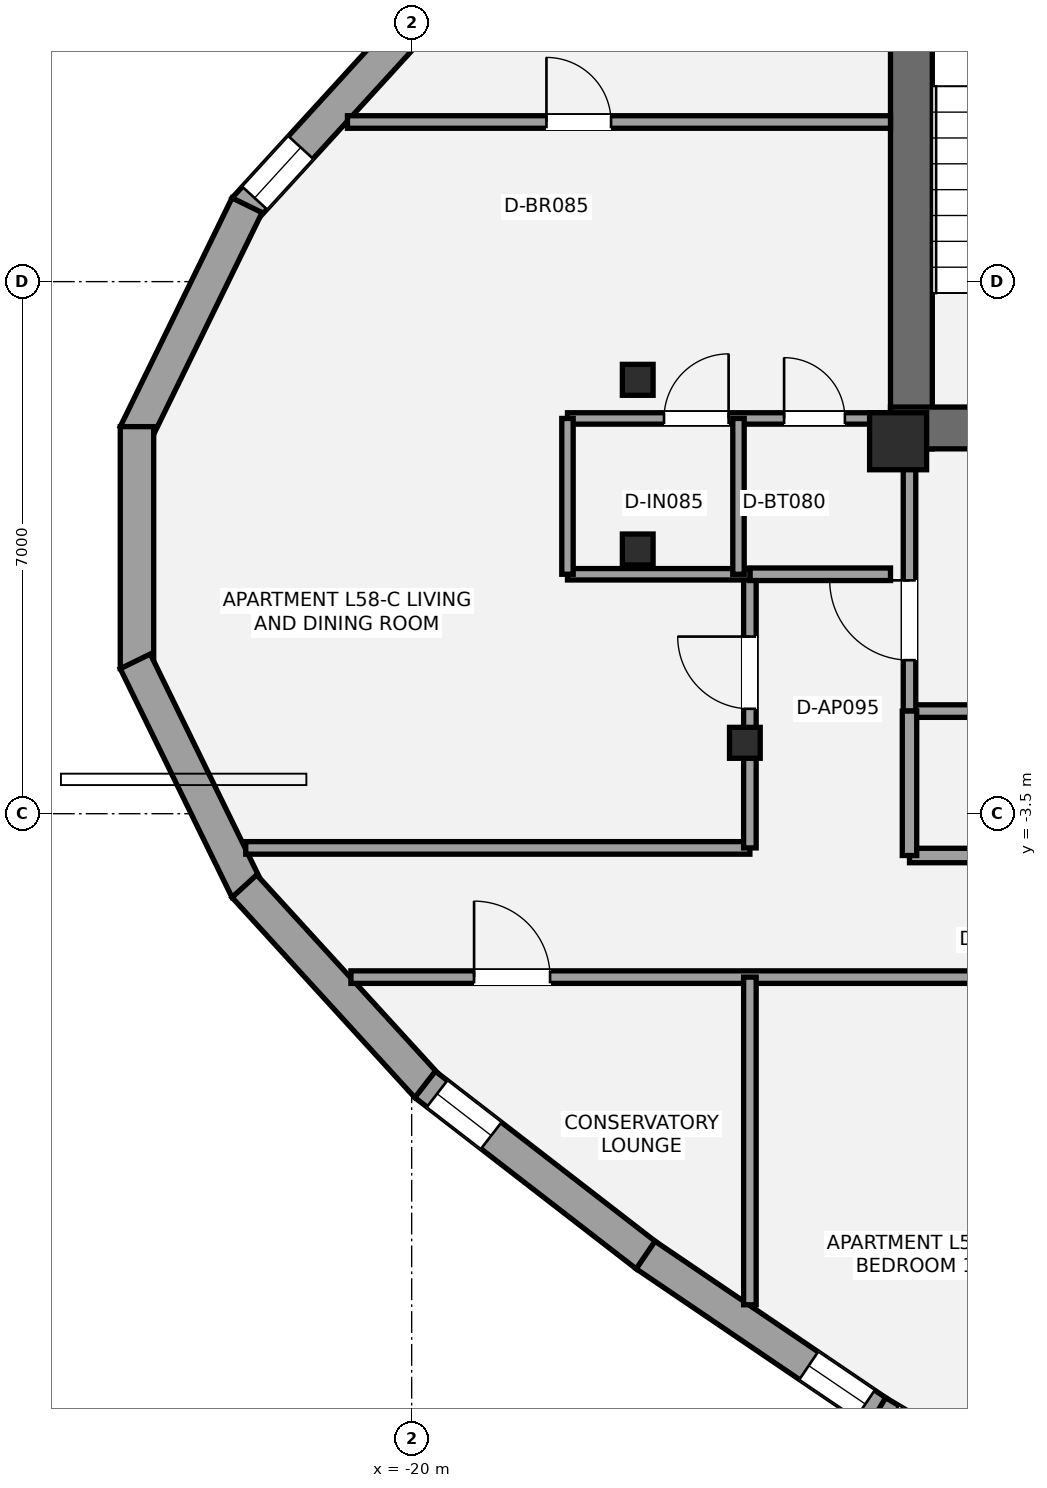
"""IFC4 building model, lengths in metres.
Left out: names, types, materials, properties, quantities, classifications, styles, units other than length and angle.
Written with IfcOpenShell. Run it as: python <this file> out.ifc"""

import sys

from ifc_helpers import new_model, si_unit, direction, frame, frame_2d, origin, origin_2d, place, context, subcontext, project, spatial, rectangle, i_section, extrude, element, fill, save


model = new_model("IFC4")
c1 = context("Model", 3, precision=1e-05, world=origin(), true_north=direction((0.0, 1.0)))
c2 = subcontext(c1, "Body", "Model", "MODEL_VIEW")
j1 = project(units=[si_unit("LENGTHUNIT", "METRE"), si_unit("PLANEANGLEUNIT", "RADIAN")], contexts=[c1])
p1 = place(None, origin())
s1 = spatial("IfcSite", under=j1, at=p1, CompositionType="ELEMENT")
p2 = place(p1, origin())
s2 = spatial("IfcBuilding", under=s1, at=p2, CompositionType="ELEMENT")
p3 = place(p2, frame((0.0, 0.0, 210.0)))
s3 = spatial("IfcBuildingStorey", under=s2, at=p3, CompositionType="ELEMENT", Elevation=210.0)
p4 = place(p3, frame((-13.425, 1.3, 0.0), z_axis=(0.0, 0.0, 1.0), x_axis=(0.0, 1.0, 0.0)))
e1 = element("IfcWall", 1, at=p4, inside=s3, PredefinedType="SHEAR", context=c2, shape_type="SweptSolid", body=[
    extrude(rectangle(XDim=8.25, YDim=0.55, at=frame_2d((4.125, 0.0))), origin(), (0.0, 0.0, 1.0), 3.15),
])
p5 = place(p3, frame((-4.925, 1.575, 0.0), z_axis=(0.0, 0.0, 1.0), x_axis=(-1.0, 0.0, 0.0)))
e2 = element("IfcWall", 2, at=p5, inside=s3, PredefinedType="SHEAR", context=c2, shape_type="SweptSolid", body=[
    extrude(rectangle(XDim=8.775, YDim=0.55, at=frame_2d((4.387, 0.0))), origin(), (0.0, 0.0, 1.0), 3.15),
])
p6 = place(p5, frame((5.375, 0.0, 0.0)))
e3 = element("IfcOpeningElement", 3, at=p6, cuts=e2, PredefinedType="OPENING", context=c2, shape_type="SweptSolid", body=[
    extrude(rectangle(XDim=1.05, YDim=2.15, at=frame_2d((0.525, 1.075))), frame((0.0, 0.285, 0.0), z_axis=(0.0, -1.0, 0.0), x_axis=(1.0, 0.0, 0.0)), (0.0, 0.0, 1.0), 0.57),
])
p7 = place(p5, frame((3.705, 0.0, 0.0)))
e4 = element("IfcOpeningElement", 4, at=p7, cuts=e2, PredefinedType="OPENING", context=c2, shape_type="SweptSolid", body=[
    extrude(rectangle(XDim=1.1, YDim=2.2, at=frame_2d((0.55, 1.1))), frame((0.0, 0.285, 0.0), z_axis=(0.0, -1.0, 0.0), x_axis=(1.0, 0.0, 0.0)), (0.0, 0.0, 1.0), 0.57),
])
p8 = place(p3, frame((-13.6, 1.4, 0.0), z_axis=(0.0, 0.0, 1.0), x_axis=(1.0, 0.0, 0.0)))
e5 = element("IfcColumn", 5, at=p8, inside=s3, PredefinedType="PILASTER", context=c2, shape_type="SweptSolid", body=[
    extrude(rectangle(XDim=0.75, YDim=0.75, at=origin_2d()), origin(), (0.0, 0.0, 1.0), 3.15),
])
for number, where, z_axis, x_axis in (
    (6, (-17.026, 2.208, 0.0), (0.0, 0.0, 1.0), (1.0, 0.0, 0.0)),
    (7, (-17.026, -0.024, 0.0), (0.0, 0.0, 1.0), (1.0, 0.0, 0.0)),
    (8, (-15.616, -2.567, 0.0), (0.0, 0.0, 1.0), (1.0, 0.0, 0.0)),
):
    element("IfcColumn", number, at=place(p3, frame(where, z_axis=z_axis, x_axis=x_axis)), inside=s3, PredefinedType="COLUMN", context=c2, shape_type="SweptSolid", body=[
        extrude(i_section(OverallWidth=0.404, OverallDepth=0.407, WebThickness=0.027, FlangeThickness=0.044, at=origin_2d()), origin(), (0.0, 0.0, 1.0), 3.15),
    ])
p9 = place(p3, frame((-22.201, 4.453, 0.0), z_axis=(0.0, 0.0, 1.0), x_axis=(0.674353738675, 0.738408447362, 0.0)))
e9 = element("IfcWall", 9, at=p9, inside=s3, PredefinedType="STANDARD", context=c2, shape_type="SweptSolid", body=[
    extrude(rectangle(XDim=3.568, YDim=0.44, at=frame_2d((1.784, 0.0))), origin(), (0.0, 0.0, 1.0), 2.336),
])
p10 = place(p9, frame((0.2, 0.0, 0.42)))
e10 = element("IfcOpeningElement", 10, at=p10, cuts=e9, PredefinedType="OPENING", context=c2, shape_type="SweptSolid", body=[
    extrude(rectangle(XDim=0.9, YDim=1.35, at=frame_2d((0.45, 0.675))), frame((0.0, 0.23, 0.0), z_axis=(0.0, -1.0, 0.0), x_axis=(1.0, 0.0, 0.0)), (0.0, 0.0, 1.0), 0.46),
])
p11 = place(p3, frame((-23.636, 1.496, 0.0), z_axis=(0.0, 0.0, 1.0), x_axis=(0.439000922584, 0.898486610902, 0.0)))
e11 = element("IfcWall", 11, at=p11, inside=s3, PredefinedType="STANDARD", context=c2, shape_type="SweptSolid", body=[
    extrude(rectangle(XDim=3.349, YDim=0.44, at=frame_2d((1.675, 0.0))), origin(), (0.0, 0.0, 1.0), 2.336),
])
p12 = place(p3, frame((-23.614, -1.592, 0.0), z_axis=(0.0, 0.0, 1.0), x_axis=(0.0, 1.0, 0.0)))
e12 = element("IfcWall", 12, at=p12, inside=s3, PredefinedType="STANDARD", context=c2, shape_type="SweptSolid", body=[
    extrude(rectangle(XDim=3.185, YDim=0.44, at=frame_2d((1.592, 0.0))), origin(), (0.0, 0.0, 1.0), 2.336),
])
p13 = place(p3, frame((-22.166, -4.505, 0.0), z_axis=(0.0, 0.0, 1.0), x_axis=(-0.439000922584, 0.898486610902, 0.0)))
e13 = element("IfcWall", 13, at=p13, inside=s3, PredefinedType="STANDARD", context=c2, shape_type="SweptSolid", body=[
    extrude(rectangle(XDim=3.349, YDim=0.44, at=frame_2d((1.675, 0.0))), origin(), (0.0, 0.0, 1.0), 2.336),
])
p14 = place(p3, frame((-19.795, -7.087, 0.0), z_axis=(0.0, 0.0, 1.0), x_axis=(-0.674353738675, 0.738408447362, 0.0)))
e14 = element("IfcWall", 14, at=p14, inside=s3, PredefinedType="STANDARD", context=c2, shape_type="SweptSolid", body=[
    extrude(rectangle(XDim=3.568, YDim=0.44, at=frame_2d((1.784, 0.0))), origin(), (0.0, 0.0, 1.0), 2.336),
])
p15 = place(p3, frame((-16.911, -9.314, 0.0), z_axis=(0.0, 0.0, 1.0), x_axis=(-0.791016617957, 0.61179466336, 0.0)))
e15 = element("IfcWall", 15, at=p15, inside=s3, PredefinedType="STANDARD", context=c2, shape_type="SweptSolid", body=[
    extrude(rectangle(XDim=3.682, YDim=0.44, at=frame_2d((1.841, 0.0))), origin(), (0.0, 0.0, 1.0), 2.336),
])
p16 = place(p15, frame((2.582, 0.0, 0.42)))
e16 = element("IfcOpeningElement", 16, at=p16, cuts=e15, PredefinedType="OPENING", context=c2, shape_type="SweptSolid", body=[
    extrude(rectangle(XDim=0.9, YDim=1.35, at=frame_2d((0.45, 0.675))), frame((0.0, 0.23, 0.0), z_axis=(0.0, -1.0, 0.0), x_axis=(1.0, 0.0, 0.0)), (0.0, 0.0, 1.0), 0.46),
])
p17 = place(p3, frame((-13.865, -11.379, 0.0), z_axis=(0.0, 0.0, 1.0), x_axis=(-0.827589832786, 0.561333295529, 0.0)))
e17 = element("IfcWall", 17, at=p17, inside=s3, PredefinedType="STANDARD", context=c2, shape_type="SweptSolid", body=[
    extrude(rectangle(XDim=3.693, YDim=0.44, at=frame_2d((1.847, 0.0))), origin(), (0.0, 0.0, 1.0), 2.336),
])
p18 = place(p17, frame((0.2, 0.0, 0.42)))
e18 = element("IfcOpeningElement", 18, at=p18, cuts=e17, PredefinedType="OPENING", context=c2, shape_type="SweptSolid", body=[
    extrude(rectangle(XDim=0.9, YDim=1.35, at=frame_2d((0.45, 0.675))), frame((0.0, 0.23, 0.0), z_axis=(0.0, -1.0, 0.0), x_axis=(1.0, 0.0, 0.0)), (0.0, 0.0, 1.0), 0.46),
])
p19 = place(p3, frame((-10.555, -13.348, 0.0), z_axis=(0.0, 0.0, 1.0), x_axis=(-0.859415840392, 0.511277237204, 0.0)))
e19 = element("IfcWall", 19, at=p19, inside=s3, PredefinedType="STANDARD", context=c2, shape_type="SweptSolid", body=[
    extrude(rectangle(XDim=3.864, YDim=0.44, at=frame_2d((1.932, 0.0))), origin(), (0.0, 0.0, 1.0), 2.336),
])
p20 = place(p19, frame((2.764, 0.0, 0.58)))
e20 = element("IfcOpeningElement", 20, at=p20, cuts=e19, PredefinedType="OPENING", context=c2, shape_type="SweptSolid", body=[
    extrude(rectangle(XDim=0.9, YDim=1.35, at=frame_2d((0.45, 0.675))), frame((0.0, 0.23, 0.0), z_axis=(0.0, -1.0, 0.0), x_axis=(1.0, 0.0, 0.0)), (0.0, 0.0, 1.0), 0.46),
])
p21 = place(p3, frame((-13.45, -2.15, 0.0), z_axis=(0.0, 0.0, 1.0), x_axis=(1.0, 0.0, 0.0)))
e21 = element("IfcWall", 21, at=p21, inside=s3, PredefinedType="PARTITIONING", context=c2, shape_type="SweptSolid", body=[
    extrude(rectangle(XDim=6.25, YDim=0.165, at=frame_2d((3.125, 0.0))), origin(), (0.0, 0.0, 1.0), 2.423),
])
p22 = place(p3, frame((-13.45, -2.15, 0.0), z_axis=(0.0, 0.0, 1.0), x_axis=(0.0, 1.0, 0.0)))
e22 = element("IfcWall", 22, at=p22, inside=s3, PredefinedType="PARTITIONING", context=c2, shape_type="SweptSolid", body=[
    extrude(rectangle(XDim=3.5, YDim=0.165, at=frame_2d((1.75, 0.0))), origin(), (0.0, 0.0, 1.0), 2.423),
])
p23 = place(p22, frame((0.67, 0.0, 0.0)))
e23 = element("IfcOpeningElement", 23, at=p23, cuts=e22, PredefinedType="OPENING", context=c2, shape_type="SweptSolid", body=[
    extrude(rectangle(XDim=1.05, YDim=2.15, at=frame_2d((0.525, 1.075))), frame((0.0, 0.093, 0.0), z_axis=(0.0, -1.0, 0.0), x_axis=(1.0, 0.0, 0.0)), (0.0, 0.0, 1.0), 0.185),
])
p24 = place(p3, frame((-13.45, -4.05, 0.0), z_axis=(0.0, 0.0, 1.0), x_axis=(1.0, 0.0, 0.0)))
e24 = element("IfcWall", 24, at=p24, inside=s3, PredefinedType="PLUMBINGWALL", context=c2, shape_type="SweptSolid", body=[
    extrude(rectangle(XDim=11.35, YDim=0.19, at=frame_2d((5.675, 0.0))), origin(), (0.0, 0.0, 1.0), 2.357),
])
p25 = place(p24, frame((1.25, 0.0, 0.0)))
e25 = element("IfcOpeningElement", 25, at=p25, cuts=e24, PredefinedType="OPENING", context=c2, shape_type="SweptSolid", body=[
    extrude(rectangle(XDim=0.85, YDim=2.1, at=frame_2d((0.425, 1.05))), frame((0.0, 0.105, 0.0), z_axis=(0.0, -1.0, 0.0), x_axis=(1.0, 0.0, 0.0)), (0.0, 0.0, 1.0), 0.21),
])
p26 = place(p24, frame((5.1, 0.0, 0.0)))
e26 = element("IfcOpeningElement", 26, at=p26, cuts=e24, PredefinedType="OPENING", context=c2, shape_type="SweptSolid", body=[
    extrude(rectangle(XDim=0.85, YDim=2.1, at=frame_2d((0.425, 1.05))), frame((0.0, 0.105, 0.0), z_axis=(0.0, -1.0, 0.0), x_axis=(1.0, 0.0, 0.0)), (0.0, 0.0, 1.0), 0.21),
])
p27 = place(p24, frame((8.95, 0.0, 0.0)))
e27 = element("IfcOpeningElement", 27, at=p27, cuts=e24, PredefinedType="OPENING", context=c2, shape_type="SweptSolid", body=[
    extrude(rectangle(XDim=0.95, YDim=2.15, at=frame_2d((0.475, 1.075))), frame((0.0, 0.105, 0.0), z_axis=(0.0, -1.0, 0.0), x_axis=(1.0, 0.0, 0.0)), (0.0, 0.0, 1.0), 0.21),
])
p28 = place(p3, frame((-13.45, -4.05, 0.0), z_axis=(0.0, 0.0, 1.0), x_axis=(0.0, 1.0, 0.0)))
e28 = element("IfcWall", 28, at=p28, inside=s3, PredefinedType="PLUMBINGWALL", context=c2, shape_type="SweptSolid", body=[
    extrude(rectangle(XDim=1.9, YDim=0.19, at=frame_2d((0.95, 0.0))), origin(), (0.0, 0.0, 1.0), 2.423),
])
p29 = place(p3, frame((-20.799, -5.65, 0.0), z_axis=(0.0, 0.0, 1.0), x_axis=(1.0, 0.0, 0.0)))
e29 = element("IfcWall", 29, at=p29, inside=s3, PredefinedType="PARTITIONING", context=c2, shape_type="SweptSolid", body=[
    extrude(rectangle(XDim=41.598, YDim=0.165, at=frame_2d((20.799, 0.0))), origin(), (0.0, 0.0, 1.0), 2.357),
])
p30 = place(p29, frame((1.62, 0.0, 0.0)))
e30 = element("IfcOpeningElement", 30, at=p30, cuts=e29, PredefinedType="OPENING", context=c2, shape_type="SweptSolid", body=[
    extrude(rectangle(XDim=1.0, YDim=2.15, at=frame_2d((0.5, 1.075))), frame((0.0, 0.093, 0.0), z_axis=(0.0, -1.0, 0.0), x_axis=(1.0, 0.0, 0.0)), (0.0, 0.0, 1.0), 0.185),
])
p31 = place(p29, frame((38.978, 0.0, 0.0)))
e31 = element("IfcOpeningElement", 31, at=p31, cuts=e29, PredefinedType="OPENING", context=c2, shape_type="SweptSolid", body=[
    extrude(rectangle(XDim=1.0, YDim=2.15, at=frame_2d((0.5, 1.075))), frame((0.0, 0.093, 0.0), z_axis=(0.0, -1.0, 0.0), x_axis=(1.0, 0.0, 0.0)), (0.0, 0.0, 1.0), 0.185),
])
p32 = place(p29, frame((15.109, 0.0, 0.0)))
e32 = element("IfcOpeningElement", 32, at=p32, cuts=e29, PredefinedType="OPENING", context=c2, shape_type="SweptSolid", body=[
    extrude(rectangle(XDim=0.95, YDim=2.15, at=frame_2d((0.475, 1.075))), frame((0.0, 0.093, 0.0), z_axis=(0.0, -1.0, 0.0), x_axis=(1.0, 0.0, 0.0)), (0.0, 0.0, 1.0), 0.185),
])
p33 = place(p29, frame((28.699, 0.0, 0.0)))
e33 = element("IfcOpeningElement", 33, at=p33, cuts=e29, PredefinedType="OPENING", context=c2, shape_type="SweptSolid", body=[
    extrude(rectangle(XDim=0.95, YDim=2.15, at=frame_2d((0.475, 1.075))), frame((0.0, 0.093, 0.0), z_axis=(0.0, -1.0, 0.0), x_axis=(1.0, 0.0, 0.0)), (0.0, 0.0, 1.0), 0.185),
])
p34 = place(p3, frame((-22.183, -3.95, 0.0), z_axis=(0.0, 0.0, 1.0), x_axis=(1.0, 0.0, 0.0)))
e34 = element("IfcWall", 34, at=p34, inside=s3, PredefinedType="PARTITIONING", context=c2, shape_type="SweptSolid", body=[
    extrude(rectangle(XDim=6.633, YDim=0.165, at=frame_2d((3.316, 0.0))), origin(), (0.0, 0.0, 1.0), 2.423),
])
p35 = place(p3, frame((-15.55, -3.95, 0.0), z_axis=(0.0, 0.0, 1.0), x_axis=(0.0, 1.0, 0.0)))
e35 = element("IfcWall", 35, at=p35, inside=s3, PredefinedType="PARTITIONING", context=c2, shape_type="SweptSolid", body=[
    extrude(rectangle(XDim=3.6, YDim=0.165, at=frame_2d((1.8, 0.0))), origin(), (0.0, 0.0, 1.0), 2.357),
])
p36 = place(p35, frame((1.83, 0.0, 0.0)))
e36 = element("IfcOpeningElement", 36, at=p36, cuts=e35, PredefinedType="OPENING", context=c2, shape_type="SweptSolid", body=[
    extrude(rectangle(XDim=0.95, YDim=2.15, at=frame_2d((0.475, 1.075))), frame((0.0, 0.093, 0.0), z_axis=(0.0, -1.0, 0.0), x_axis=(1.0, 0.0, 0.0)), (0.0, 0.0, 1.0), 0.185),
])
p37 = place(p3, frame((-15.55, -0.35, 0.0), z_axis=(0.0, 0.0, 1.0), x_axis=(1.0, 0.0, 0.0)))
e37 = element("IfcWall", 37, at=p37, inside=s3, PredefinedType="PARTITIONING", context=c2, shape_type="SweptSolid", body=[
    extrude(rectangle(XDim=1.85, YDim=0.165, at=frame_2d((0.925, 0.0))), origin(), (0.0, 0.0, 1.0), 2.97),
])
p38 = place(p3, frame((-20.845, 5.6, 0.0), z_axis=(0.0, 0.0, 1.0), x_axis=(1.0, 0.0, 0.0)))
e38 = element("IfcWall", 38, at=p38, inside=s3, PredefinedType="PARTITIONING", context=c2, shape_type="SweptSolid", body=[
    extrude(rectangle(XDim=7.145, YDim=0.165, at=frame_2d((3.572, 0.0))), origin(), (0.0, 0.0, 1.0), 2.423),
])
p39 = place(p38, frame((2.618, 0.0, 0.0)))
e39 = element("IfcOpeningElement", 39, at=p39, cuts=e38, PredefinedType="OPENING", context=c2, shape_type="SweptSolid", body=[
    extrude(rectangle(XDim=0.85, YDim=2.1, at=frame_2d((0.425, 1.05))), frame((0.0, 0.093, 0.0), z_axis=(0.0, -1.0, 0.0), x_axis=(1.0, 0.0, 0.0)), (0.0, 0.0, 1.0), 0.185),
])
p40 = place(p3, frame((-15.55, -9.961, 0.0), z_axis=(0.0, 0.0, 1.0), x_axis=(0.0, 1.0, 0.0)))
e40 = element("IfcWall", 40, at=p40, inside=s3, PredefinedType="PARTITIONING", context=c2, shape_type="SweptSolid", body=[
    extrude(rectangle(XDim=4.311, YDim=0.165, at=frame_2d((2.156, 0.0))), origin(), (0.0, 0.0, 1.0), 2.423),
])
p41 = place(p3, frame((-17.95, 1.7, 0.0), z_axis=(0.0, 0.0, 1.0), x_axis=(1.0, 0.0, 0.0)))
e41 = element("IfcWall", 41, at=p41, inside=s3, PredefinedType="PLUMBINGWALL", context=c2, shape_type="SweptSolid", body=[
    extrude(rectangle(XDim=4.25, YDim=0.15, at=frame_2d((2.125, 0.0))), origin(), (0.0, 0.0, 1.0), 2.423),
])
p42 = place(p41, frame((2.85, 0.0, 0.0)))
e42 = element("IfcOpeningElement", 42, at=p42, cuts=e41, PredefinedType="OPENING", context=c2, shape_type="SweptSolid", body=[
    extrude(rectangle(XDim=0.8, YDim=2.1, at=frame_2d((0.4, 1.05))), frame((0.0, 0.085, 0.0), z_axis=(0.0, -1.0, 0.0), x_axis=(1.0, 0.0, 0.0)), (0.0, 0.0, 1.0), 0.17),
])
p43 = place(p41, frame((1.27, 0.0, 0.0)))
e43 = element("IfcOpeningElement", 43, at=p43, cuts=e41, PredefinedType="OPENING", context=c2, shape_type="SweptSolid", body=[
    extrude(rectangle(XDim=0.85, YDim=2.1, at=frame_2d((0.425, 1.05))), frame((0.0, 0.085, 0.0), z_axis=(0.0, -1.0, 0.0), x_axis=(1.0, 0.0, 0.0)), (0.0, 0.0, 1.0), 0.17),
])
p44 = place(p3, frame((-17.95, -0.35, 0.0), z_axis=(0.0, 0.0, 1.0), x_axis=(1.0, 0.0, 0.0)))
e44 = element("IfcWall", 44, at=p44, inside=s3, PredefinedType="PLUMBINGWALL", context=c2, shape_type="SweptSolid", body=[
    extrude(rectangle(XDim=2.4, YDim=0.15, at=frame_2d((1.2, 0.0))), origin(), (0.0, 0.0, 1.0), 2.423),
])
p45 = place(p3, frame((-15.7, -0.35, 0.0), z_axis=(0.0, 0.0, 1.0), x_axis=(0.0, 1.0, 0.0)))
e45 = element("IfcWall", 45, at=p45, inside=s3, PredefinedType="PLUMBINGWALL", context=c2, shape_type="SweptSolid", body=[
    extrude(rectangle(XDim=2.05, YDim=0.15, at=frame_2d((1.025, 0.0))), origin(), (0.0, 0.0, 1.0), 2.97),
])
p46 = place(p3, frame((-17.95, -0.35, 0.0), z_axis=(0.0, 0.0, 1.0), x_axis=(0.0, 1.0, 0.0)))
e46 = element("IfcWall", 46, at=p46, inside=s3, PredefinedType="PLUMBINGWALL", context=c2, shape_type="SweptSolid", body=[
    extrude(rectangle(XDim=2.05, YDim=0.15, at=frame_2d((1.025, 0.0))), origin(), (0.0, 0.0, 1.0), 2.423),
])
p47 = place(p10, origin())
e47 = element("IfcWindow", 47, at=p47, inside=s3, PartitioningType="SINGLE_PANEL", PredefinedType="WINDOW", context=c2, shape_type="SweptSolid", body=[
    extrude(rectangle(XDim=0.9, YDim=1.35, at=frame_2d((0.45, 0.675))), frame((0.0, -0.01, 0.0), z_axis=(0.0, -1.0, 0.0), x_axis=(1.0, 0.0, 0.0)), (0.0, 0.0, 1.0), 0.06),
])
fill(e10, e47)
p48 = place(p16, origin())
e48 = element("IfcWindow", 48, at=p48, inside=s3, PartitioningType="SINGLE_PANEL", PredefinedType="WINDOW", context=c2, shape_type="SweptSolid", body=[
    extrude(rectangle(XDim=0.9, YDim=1.35, at=frame_2d((0.45, 0.675))), frame((0.0, -0.01, 0.0), z_axis=(0.0, -1.0, 0.0), x_axis=(1.0, 0.0, 0.0)), (0.0, 0.0, 1.0), 0.06),
])
fill(e16, e48)
p49 = place(p18, origin())
e49 = element("IfcWindow", 49, at=p49, inside=s3, PartitioningType="SINGLE_PANEL", PredefinedType="WINDOW", context=c2, shape_type="SweptSolid", body=[
    extrude(rectangle(XDim=0.9, YDim=1.35, at=frame_2d((0.45, 0.675))), frame((0.0, -0.01, 0.0), z_axis=(0.0, -1.0, 0.0), x_axis=(1.0, 0.0, 0.0)), (0.0, 0.0, 1.0), 0.06),
])
fill(e18, e49)
p50 = place(p23, origin())
e50 = element("IfcDoor", 50, at=p50, inside=s3, OperationType="SINGLE_SWING_RIGHT", PredefinedType="DOOR", context=c2, shape_type="SweptSolid", body=[
    extrude(rectangle(XDim=1.05, YDim=2.15, at=frame_2d((0.525, 1.075))), frame((0.0, 0.025, 0.0), z_axis=(0.0, -1.0, 0.0), x_axis=(1.0, 0.0, 0.0)), (0.0, 0.0, 1.0), 0.05),
])
fill(e23, e50)
p51 = place(p30, origin())
e51 = element("IfcDoor", 51, at=p51, inside=s3, OperationType="SINGLE_SWING_LEFT", PredefinedType="DOOR", context=c2, shape_type="SweptSolid", body=[
    extrude(rectangle(XDim=1.0, YDim=2.15, at=frame_2d((0.5, 1.075))), frame((0.0, 0.025, 0.0), z_axis=(0.0, -1.0, 0.0), x_axis=(1.0, 0.0, 0.0)), (0.0, 0.0, 1.0), 0.05),
])
fill(e30, e51)
p52 = place(p36, origin())
e52 = element("IfcDoor", 52, at=p52, inside=s3, OperationType="SINGLE_SWING_RIGHT", PredefinedType="DOOR", context=c2, shape_type="SweptSolid", body=[
    extrude(rectangle(XDim=0.95, YDim=2.15, at=frame_2d((0.475, 1.075))), frame((0.0, 0.025, 0.0), z_axis=(0.0, -1.0, 0.0), x_axis=(1.0, 0.0, 0.0)), (0.0, 0.0, 1.0), 0.05),
])
fill(e36, e52)
p53 = place(p42, origin())
e53 = element("IfcDoor", 53, at=p53, inside=s3, OperationType="SINGLE_SWING_LEFT", PredefinedType="DOOR", context=c2, shape_type="SweptSolid", body=[
    extrude(rectangle(XDim=0.8, YDim=2.1, at=frame_2d((0.4, 1.05))), frame((0.0, 0.025, 0.0), z_axis=(0.0, -1.0, 0.0), x_axis=(1.0, 0.0, 0.0)), (0.0, 0.0, 1.0), 0.05),
])
fill(e42, e53)
p54 = place(p43, origin())
e54 = element("IfcDoor", 54, at=p54, inside=s3, OperationType="SINGLE_SWING_RIGHT", PredefinedType="DOOR", context=c2, shape_type="SweptSolid", body=[
    extrude(rectangle(XDim=0.85, YDim=2.1, at=frame_2d((0.425, 1.05))), frame((0.0, 0.025, 0.0), z_axis=(0.0, -1.0, 0.0), x_axis=(1.0, 0.0, 0.0)), (0.0, 0.0, 1.0), 0.05),
])
fill(e43, e54)
p55 = place(p39, origin())
e55 = element("IfcDoor", 55, at=p55, inside=s3, OperationType="SINGLE_SWING_LEFT", PredefinedType="DOOR", context=c2, shape_type="SweptSolid", body=[
    extrude(rectangle(XDim=0.85, YDim=2.1, at=frame_2d((0.425, 1.05))), frame((0.0, 0.025, 0.0), z_axis=(0.0, -1.0, 0.0), x_axis=(1.0, 0.0, 0.0)), (0.0, 0.0, 1.0), 0.05),
])
fill(e39, e55)
save(model, sys.argv[1])
